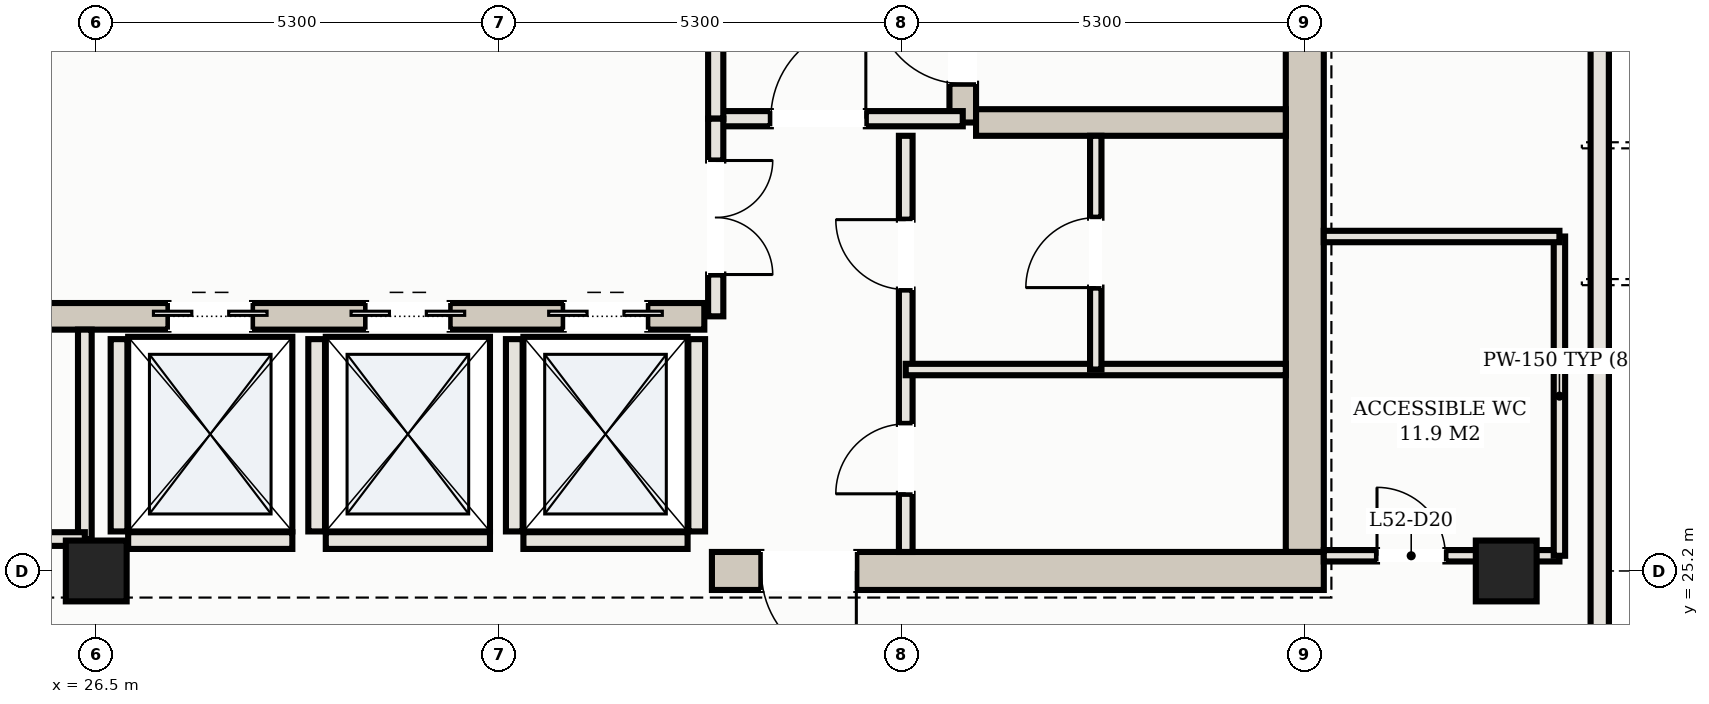
"""IFC4 building model, lengths in metres.
Left out: names, types, materials, properties, quantities, classifications, styles, units other than length and angle.
Written with IfcOpenShell. Run it as: python <this file> out.ifc"""

import sys

from ifc_helpers import new_model, si_unit, direction, frame, frame_2d, origin, origin_2d, place, context, subcontext, project, spatial, rectangle, hollow_rectangle, extrude, element, fill, save


model = new_model("IFC4")
c1 = context("Model", 3, precision=1e-05, world=origin(), true_north=direction((0.0, 1.0)))
c2 = subcontext(c1, "Body", "Model", "MODEL_VIEW")
j1 = project(units=[si_unit("LENGTHUNIT", "METRE"), si_unit("PLANEANGLEUNIT", "RADIAN")], contexts=[c1])
p1 = place(None, origin())
s1 = spatial("IfcSite", under=j1, at=p1, CompositionType="ELEMENT")
p2 = place(p1, origin())
s2 = spatial("IfcBuilding", under=s1, at=p2, CompositionType="ELEMENT")
p3 = place(p2, frame((0.0, 0.0, 192.2)))
s3 = spatial("IfcBuildingStorey", under=s2, at=p3, CompositionType="ELEMENT", Elevation=192.2)
p4 = place(p3, frame((42.4, 25.45, 0.0), z_axis=(0.0, 0.0, 1.0), x_axis=(0.0, 1.0, 0.0)))
e1 = element("IfcWall", 1, at=p4, inside=s3, PredefinedType="SHEAR", context=c2, shape_type="SweptSolid", body=[
    extrude(rectangle(XDim=14.3, YDim=0.5, at=frame_2d((7.15, 0.0))), origin(), (0.0, 0.0, 1.0), 4.31),
])
p5 = place(p3, frame((34.6, 25.2, 0.0), z_axis=(0.0, 0.0, 1.0), x_axis=(1.0, 0.0, 0.0)))
e2 = element("IfcWall", 2, at=p5, inside=s3, PredefinedType="SHEAR", context=c2, shape_type="SweptSolid", body=[
    extrude(rectangle(XDim=8.05, YDim=0.5, at=frame_2d((4.025, 0.0))), origin(), (0.0, 0.0, 1.0), 4.31),
])
p6 = place(p5, frame((0.65, 0.0, 0.0)))
e3 = element("IfcOpeningElement", 3, at=p6, cuts=e2, PredefinedType="OPENING", context=c2, shape_type="SweptSolid", body=[
    extrude(rectangle(XDim=1.25, YDim=2.2, at=frame_2d((0.625, 1.1))), frame((0.0, 0.26, 0.0), z_axis=(0.0, -1.0, 0.0), x_axis=(1.0, 0.0, 0.0)), (0.0, 0.0, 1.0), 0.52),
])
p7 = place(p3, frame((37.9, 31.1, 0.0), z_axis=(0.0, 0.0, 1.0), x_axis=(0.0, 1.0, 0.0)))
e4 = element("IfcWall", 4, at=p7, inside=s3, PredefinedType="SHEAR", context=c2, shape_type="SweptSolid", body=[
    extrude(rectangle(XDim=8.65, YDim=0.35, at=frame_2d((4.325, 0.0))), origin(), (0.0, 0.0, 1.0), 4.31),
])
p8 = place(p7, frame((0.51, 0.0, 0.0)))
e5 = element("IfcOpeningElement", 5, at=p8, cuts=e4, PredefinedType="OPENING", context=c2, shape_type="SweptSolid", body=[
    extrude(rectangle(XDim=1.15, YDim=2.2, at=frame_2d((0.575, 1.1))), frame((0.0, 0.185, 0.0), z_axis=(0.0, -1.0, 0.0), x_axis=(1.0, 0.0, 0.0)), (0.0, 0.0, 1.0), 0.37),
])
p9 = place(p3, frame((38.075, 31.1, 0.0), z_axis=(0.0, 0.0, 1.0), x_axis=(1.0, 0.0, 0.0)))
e6 = element("IfcWall", 6, at=p9, inside=s3, PredefinedType="SHEAR", context=c2, shape_type="SweptSolid", body=[
    extrude(rectangle(XDim=4.075, YDim=0.35, at=frame_2d((2.038, 0.0))), origin(), (0.0, 0.0, 1.0), 4.31),
])
p10 = place(p3, frame((18.5, 28.55, 0.0), z_axis=(0.0, 0.0, 1.0), x_axis=(1.0, 0.0, 0.0)))
e7 = element("IfcWall", 7, at=p10, inside=s3, PredefinedType="SHEAR", context=c2, shape_type="SweptSolid", body=[
    extrude(rectangle(XDim=16.0, YDim=0.35, at=frame_2d((8.0, 0.0))), origin(), (0.0, 0.0, 1.0), 4.31),
])
p11 = place(p10, frame((8.95, 0.0, 0.0)))
e8 = element("IfcOpeningElement", 8, at=p11, cuts=e7, PredefinedType="OPENING", context=c2, shape_type="SweptSolid", body=[
    extrude(rectangle(XDim=1.1, YDim=2.15, at=frame_2d((0.55, 1.075))), frame((0.0, 0.185, 0.0), z_axis=(0.0, -1.0, 0.0), x_axis=(1.0, 0.0, 0.0)), (0.0, 0.0, 1.0), 0.37),
])
p12 = place(p10, frame((11.55, 0.0, 0.0)))
e9 = element("IfcOpeningElement", 9, at=p12, cuts=e7, PredefinedType="OPENING", context=c2, shape_type="SweptSolid", body=[
    extrude(rectangle(XDim=1.1, YDim=2.15, at=frame_2d((0.55, 1.075))), frame((0.0, 0.185, 0.0), z_axis=(0.0, -1.0, 0.0), x_axis=(1.0, 0.0, 0.0)), (0.0, 0.0, 1.0), 0.37),
])
p13 = place(p10, frame((14.15, 0.0, 0.0)))
e10 = element("IfcOpeningElement", 10, at=p13, cuts=e7, PredefinedType="OPENING", context=c2, shape_type="SweptSolid", body=[
    extrude(rectangle(XDim=1.1, YDim=2.15, at=frame_2d((0.55, 1.075))), frame((0.0, 0.185, 0.0), z_axis=(0.0, -1.0, 0.0), x_axis=(1.0, 0.0, 0.0)), (0.0, 0.0, 1.0), 0.37),
])
for number, where, z_axis, x_axis in (
    (11, (26.5, 25.2, 0.0), (0.0, 0.0, 1.0), (1.0, 0.0, 0.0)),
    (12, (45.05, 25.2, 0.0), (0.0, 0.0, 1.0), (1.0, 0.0, 0.0)),
):
    element("IfcColumn", number, at=place(p3, frame(where, z_axis=z_axis, x_axis=x_axis)), inside=s3, PredefinedType="COLUMN", context=c2, shape_type="SweptSolid", body=[
        extrude(hollow_rectangle(XDim=0.8, YDim=0.8, WallThickness=0.028, at=origin_2d()), origin(), (0.0, 0.0, 1.0), 4.5),
    ])
p14 = place(p3, frame((26.8, 25.72, 0.0), z_axis=(0.0, 0.0, 1.0), x_axis=(0.0, 1.0, 0.0)))
e13 = element("IfcWall", 13, at=p14, inside=s3, PredefinedType="SOLIDWALL", context=c2, shape_type="SweptSolid", body=[
    extrude(rectangle(XDim=2.53, YDim=0.22, at=frame_2d((1.265, 0.0))), origin(), (0.0, 0.0, 1.0), 4.31),
])
p15 = place(p3, frame((26.92, 25.6, 0.0), z_axis=(0.0, 0.0, 1.0), x_axis=(1.0, 0.0, 0.0)))
e14 = element("IfcWall", 14, at=p15, inside=s3, PredefinedType="SOLIDWALL", context=c2, shape_type="SweptSolid", body=[
    extrude(rectangle(XDim=2.16, YDim=0.22, at=frame_2d((1.08, 0.0))), origin(), (0.0, 0.0, 1.0), 3.505),
])
p16 = place(p3, frame((29.4, 25.72, 0.0), z_axis=(0.0, 0.0, 1.0), x_axis=(0.0, 1.0, 0.0)))
e15 = element("IfcWall", 15, at=p16, inside=s3, PredefinedType="SOLIDWALL", context=c2, shape_type="SweptSolid", body=[
    extrude(rectangle(XDim=2.53, YDim=0.22, at=frame_2d((1.265, 0.0))), origin(), (0.0, 0.0, 1.0), 4.31),
])
p17 = place(p3, frame((29.52, 25.6, 0.0), z_axis=(0.0, 0.0, 1.0), x_axis=(1.0, 0.0, 0.0)))
e16 = element("IfcWall", 16, at=p17, inside=s3, PredefinedType="SOLIDWALL", context=c2, shape_type="SweptSolid", body=[
    extrude(rectangle(XDim=2.16, YDim=0.22, at=frame_2d((1.08, 0.0))), origin(), (0.0, 0.0, 1.0), 3.505),
])
for number, where, z_axis, x_axis in (
    (17, (32.0, 25.72, 0.0), (0.0, 0.0, 1.0), (0.0, 1.0, 0.0)),
    (18, (34.4, 25.72, 0.0), (0.0, 0.0, 1.0), (0.0, 1.0, 0.0)),
):
    element("IfcWall", number, at=place(p3, frame(where, z_axis=z_axis, x_axis=x_axis)), inside=s3, PredefinedType="SOLIDWALL", context=c2, shape_type="SweptSolid", body=[
        extrude(rectangle(XDim=2.53, YDim=0.22, at=frame_2d((1.265, 0.0))), origin(), (0.0, 0.0, 1.0), 4.31),
    ])
p18 = place(p3, frame((32.12, 25.6, 0.0), z_axis=(0.0, 0.0, 1.0), x_axis=(1.0, 0.0, 0.0)))
e19 = element("IfcWall", 19, at=p18, inside=s3, PredefinedType="SOLIDWALL", context=c2, shape_type="SweptSolid", body=[
    extrude(rectangle(XDim=2.16, YDim=0.22, at=frame_2d((1.08, 0.0))), origin(), (0.0, 0.0, 1.0), 3.505),
])
p19 = place(p3, frame((46.28, 10.52, 0.0), z_axis=(0.0, 0.0, 1.0), x_axis=(0.0, 1.0, 0.0)))
e20 = element("IfcWall", 20, at=p19, inside=s3, PredefinedType="SOLIDWALL", context=c2, shape_type="SweptSolid", body=[
    extrude(rectangle(XDim=26.41, YDim=0.24, at=frame_2d((13.205, 0.0))), origin(), (0.0, 0.0, 1.0), 4.31),
])
p20 = place(p3, frame((34.65, 31.15, 0.0), z_axis=(0.0, 0.0, 1.0), x_axis=(1.0, 0.0, 0.0)))
e21 = element("IfcWall", 21, at=p20, inside=s3, PredefinedType="PARTITIONING", context=c2, shape_type="SweptSolid", body=[
    extrude(rectangle(XDim=3.25, YDim=0.2, at=frame_2d((1.625, 0.0))), origin(), (0.0, 0.0, 1.0), 4.31),
])
p21 = place(p20, frame((0.725, 0.0, 0.0)))
e22 = element("IfcOpeningElement", 22, at=p21, cuts=e21, PredefinedType="OPENING", context=c2, shape_type="SweptSolid", body=[
    extrude(rectangle(XDim=1.25, YDim=2.2, at=frame_2d((0.625, 1.1))), frame((0.0, 0.11, 0.0), z_axis=(0.0, -1.0, 0.0), x_axis=(1.0, 0.0, 0.0)), (0.0, 0.0, 1.0), 0.22),
])
p22 = place(p3, frame((34.65, 31.15, 0.0), z_axis=(0.0, 0.0, 1.0), x_axis=(0.0, 1.0, 0.0)))
e23 = element("IfcWall", 23, at=p22, inside=s3, PredefinedType="PARTITIONING", context=c2, shape_type="SweptSolid", body=[
    extrude(rectangle(XDim=5.15, YDim=0.2, at=frame_2d((2.575, 0.0))), origin(), (0.0, 0.0, 1.0), 4.31),
])
p23 = place(p22, frame((1.875, 0.0, 0.0)))
e24 = element("IfcOpeningElement", 24, at=p23, cuts=e23, PredefinedType="OPENING", context=c2, shape_type="SweptSolid", body=[
    extrude(rectangle(XDim=1.25, YDim=2.2, at=frame_2d((0.625, 1.1))), frame((0.0, 0.11, 0.0), z_axis=(0.0, -1.0, 0.0), x_axis=(1.0, 0.0, 0.0)), (0.0, 0.0, 1.0), 0.22),
])
p24 = place(p3, frame((37.15, 25.45, 0.0), z_axis=(0.0, 0.0, 1.0), x_axis=(0.0, 1.0, 0.0)))
e25 = element("IfcWall", 25, at=p24, inside=s3, PredefinedType="PARTITIONING", context=c2, shape_type="SweptSolid", body=[
    extrude(rectangle(XDim=5.475, YDim=0.18, at=frame_2d((2.738, 0.0))), origin(), (0.0, 0.0, 1.0), 3.655),
])
p25 = place(p24, frame((0.765, 0.0, 0.0)))
e26 = element("IfcOpeningElement", 26, at=p25, cuts=e25, PredefinedType="OPENING", context=c2, shape_type="SweptSolid", body=[
    extrude(rectangle(XDim=0.92, YDim=2.15, at=frame_2d((0.46, 1.075))), frame((0.0, 0.1, 0.0), z_axis=(0.0, -1.0, 0.0), x_axis=(1.0, 0.0, 0.0)), (0.0, 0.0, 1.0), 0.2),
])
p26 = place(p24, frame((3.452, 0.0, 0.0)))
e27 = element("IfcOpeningElement", 27, at=p26, cuts=e25, PredefinedType="OPENING", context=c2, shape_type="SweptSolid", body=[
    extrude(rectangle(XDim=0.92, YDim=2.15, at=frame_2d((0.46, 1.075))), frame((0.0, 0.1, 0.0), z_axis=(0.0, -1.0, 0.0), x_axis=(1.0, 0.0, 0.0)), (0.0, 0.0, 1.0), 0.2),
])
p27 = place(p3, frame((37.15, 27.85, 0.0), z_axis=(0.0, 0.0, 1.0), x_axis=(1.0, 0.0, 0.0)))
e28 = element("IfcWall", 28, at=p27, inside=s3, PredefinedType="PARTITIONING", context=c2, shape_type="SweptSolid", body=[
    extrude(rectangle(XDim=5.0, YDim=0.15, at=frame_2d((2.5, 0.0))), origin(), (0.0, 0.0, 1.0), 4.31),
])
p28 = place(p3, frame((39.65, 27.85, 0.0), z_axis=(0.0, 0.0, 1.0), x_axis=(0.0, 1.0, 0.0)))
e29 = element("IfcWall", 29, at=p28, inside=s3, PredefinedType="PARTITIONING", context=c2, shape_type="SweptSolid", body=[
    extrude(rectangle(XDim=3.075, YDim=0.15, at=frame_2d((1.538, 0.0))), origin(), (0.0, 0.0, 1.0), 4.31),
])
p29 = place(p28, frame((1.078, 0.0, 0.0)))
e30 = element("IfcOpeningElement", 30, at=p29, cuts=e29, PredefinedType="OPENING", context=c2, shape_type="SweptSolid", body=[
    extrude(rectangle(XDim=0.92, YDim=2.15, at=frame_2d((0.46, 1.075))), frame((0.0, 0.085, 0.0), z_axis=(0.0, -1.0, 0.0), x_axis=(1.0, 0.0, 0.0)), (0.0, 0.0, 1.0), 0.17),
])
p30 = place(p3, frame((34.65, 28.55, 0.0), z_axis=(0.0, 0.0, 1.0), x_axis=(0.0, 1.0, 0.0)))
e31 = element("IfcWall", 31, at=p30, inside=s3, PredefinedType="PARTITIONING", context=c2, shape_type="SweptSolid", body=[
    extrude(rectangle(XDim=2.6, YDim=0.2, at=frame_2d((1.3, 0.0))), origin(), (0.0, 0.0, 1.0), 4.31),
])
p31 = place(p30, frame((0.55, 0.0, 0.0)))
e32 = element("IfcOpeningElement", 32, at=p31, cuts=e31, PredefinedType="OPENING", context=c2, shape_type="SweptSolid", body=[
    extrude(rectangle(XDim=1.5, YDim=2.25, at=frame_2d((0.75, 1.125))), frame((0.0, 0.11, 0.0), z_axis=(0.0, -1.0, 0.0), x_axis=(1.0, 0.0, 0.0)), (0.0, 0.0, 1.0), 0.22),
])
p32 = place(p3, frame((26.35, 25.62, 0.0), z_axis=(0.0, 0.0, 1.0), x_axis=(0.0, 1.0, 0.0)))
e33 = element("IfcWall", 33, at=p32, inside=s3, PredefinedType="PARTITIONING", context=c2, shape_type="SweptSolid", body=[
    extrude(rectangle(XDim=2.755, YDim=0.18, at=frame_2d((1.377, 0.0))), origin(), (0.0, 0.0, 1.0), 4.31),
])
p33 = place(p3, frame((18.45, 25.62, 0.0), z_axis=(0.0, 0.0, 1.0), x_axis=(1.0, 0.0, 0.0)))
e34 = element("IfcWall", 34, at=p33, inside=s3, PredefinedType="PARTITIONING", context=c2, shape_type="SweptSolid", body=[
    extrude(rectangle(XDim=7.9, YDim=0.18, at=frame_2d((3.95, 0.0))), origin(), (0.0, 0.0, 1.0), 4.31),
])
p34 = place(p33, frame((3.34, 0.0, 0.0)))
e35 = element("IfcOpeningElement", 35, at=p34, cuts=e34, PredefinedType="OPENING", context=c2, shape_type="SweptSolid", body=[
    extrude(rectangle(XDim=0.92, YDim=2.15, at=frame_2d((0.46, 1.075))), frame((0.0, 0.1, 0.0), z_axis=(0.0, -1.0, 0.0), x_axis=(1.0, 0.0, 0.0)), (0.0, 0.0, 1.0), 0.2),
])
p35 = place(p3, frame((42.65, 25.4, 0.0), z_axis=(0.0, 0.0, 1.0), x_axis=(1.0, 0.0, 0.0)))
e36 = element("IfcWall", 36, at=p35, inside=s3, PredefinedType="PARTITIONING", context=c2, shape_type="SweptSolid", body=[
    extrude(rectangle(XDim=3.1, YDim=0.15, at=frame_2d((1.55, 0.0))), origin(), (0.0, 0.0, 1.0), 3.655),
])
p36 = place(p35, frame((0.7, 0.0, 0.0)))
e37 = element("IfcOpeningElement", 37, at=p36, cuts=e36, PredefinedType="OPENING", context=c2, shape_type="SweptSolid", body=[
    extrude(rectangle(XDim=0.9, YDim=2.15, at=frame_2d((0.45, 1.075))), frame((0.0, 0.085, 0.0), z_axis=(0.0, -1.0, 0.0), x_axis=(1.0, 0.0, 0.0)), (0.0, 0.0, 1.0), 0.17),
])
p37 = place(p3, frame((45.75, 25.4, 0.0), z_axis=(0.0, 0.0, 1.0), x_axis=(0.0, 1.0, 0.0)))
e38 = element("IfcWall", 38, at=p37, inside=s3, PredefinedType="PARTITIONING", context=c2, shape_type="SweptSolid", body=[
    extrude(rectangle(XDim=4.2, YDim=0.15, at=frame_2d((2.1, 0.0))), origin(), (0.0, 0.0, 1.0), 4.31),
])
p38 = place(p3, frame((42.65, 29.6, 0.0), z_axis=(0.0, 0.0, 1.0), x_axis=(1.0, 0.0, 0.0)))
e39 = element("IfcWall", 39, at=p38, inside=s3, PredefinedType="PARTITIONING", context=c2, shape_type="SweptSolid", body=[
    extrude(rectangle(XDim=3.1, YDim=0.15, at=frame_2d((1.55, 0.0))), origin(), (0.0, 0.0, 1.0), 4.31),
])
p39 = place(p11, origin())
e40 = element("IfcDoor", 40, at=p39, inside=s3, OperationType="DOUBLE_DOOR_SLIDING", PredefinedType="DOOR", context=c2, shape_type="SweptSolid", body=[
    extrude(rectangle(XDim=1.1, YDim=2.15, at=frame_2d((0.55, 1.075))), frame((0.0, 0.025, 0.0), z_axis=(0.0, -1.0, 0.0), x_axis=(1.0, 0.0, 0.0)), (0.0, 0.0, 1.0), 0.05),
])
fill(e8, e40)
p40 = place(p12, origin())
e41 = element("IfcDoor", 41, at=p40, inside=s3, OperationType="DOUBLE_DOOR_SLIDING", PredefinedType="DOOR", context=c2, shape_type="SweptSolid", body=[
    extrude(rectangle(XDim=1.1, YDim=2.15, at=frame_2d((0.55, 1.075))), frame((0.0, 0.025, 0.0), z_axis=(0.0, -1.0, 0.0), x_axis=(1.0, 0.0, 0.0)), (0.0, 0.0, 1.0), 0.05),
])
fill(e9, e41)
p41 = place(p13, origin())
e42 = element("IfcDoor", 42, at=p41, inside=s3, OperationType="DOUBLE_DOOR_SLIDING", PredefinedType="DOOR", context=c2, shape_type="SweptSolid", body=[
    extrude(rectangle(XDim=1.1, YDim=2.15, at=frame_2d((0.55, 1.075))), frame((0.0, 0.025, 0.0), z_axis=(0.0, -1.0, 0.0), x_axis=(1.0, 0.0, 0.0)), (0.0, 0.0, 1.0), 0.05),
])
fill(e10, e42)
p42 = place(p6, frame((1.25, 0.0, 0.0), z_axis=(0.0, 0.0, 1.0), x_axis=(-1.0, 0.0, 0.0)))
e43 = element("IfcDoor", 43, at=p42, inside=s3, OperationType="SINGLE_SWING_LEFT", PredefinedType="DOOR", context=c2, shape_type="SweptSolid", body=[
    extrude(rectangle(XDim=1.25, YDim=2.2, at=frame_2d((0.625, 1.1))), frame((0.0, 0.025, 0.0), z_axis=(0.0, -1.0, 0.0), x_axis=(1.0, 0.0, 0.0)), (0.0, 0.0, 1.0), 0.05),
])
fill(e3, e43)
p43 = place(p21, origin())
e44 = element("IfcDoor", 44, at=p43, inside=s3, OperationType="SINGLE_SWING_RIGHT", PredefinedType="DOOR", context=c2, shape_type="SweptSolid", body=[
    extrude(rectangle(XDim=1.25, YDim=2.2, at=frame_2d((0.625, 1.1))), frame((0.0, 0.025, 0.0), z_axis=(0.0, -1.0, 0.0), x_axis=(1.0, 0.0, 0.0)), (0.0, 0.0, 1.0), 0.05),
])
fill(e22, e44)
p44 = place(p8, origin())
e45 = element("IfcDoor", 45, at=p44, inside=s3, OperationType="SINGLE_SWING_RIGHT", PredefinedType="DOOR", context=c2, shape_type="SweptSolid", body=[
    extrude(rectangle(XDim=1.15, YDim=2.2, at=frame_2d((0.575, 1.1))), frame((0.0, 0.025, 0.0), z_axis=(0.0, -1.0, 0.0), x_axis=(1.0, 0.0, 0.0)), (0.0, 0.0, 1.0), 0.05),
])
fill(e5, e45)
p45 = place(p25, origin())
e46 = element("IfcDoor", 46, at=p45, inside=s3, OperationType="SINGLE_SWING_LEFT", PredefinedType="DOOR", context=c2, shape_type="SweptSolid", body=[
    extrude(rectangle(XDim=0.92, YDim=2.15, at=frame_2d((0.46, 1.075))), frame((0.0, 0.025, 0.0), z_axis=(0.0, -1.0, 0.0), x_axis=(1.0, 0.0, 0.0)), (0.0, 0.0, 1.0), 0.05),
])
fill(e26, e46)
p46 = place(p26, origin())
e47 = element("IfcDoor", 47, at=p46, inside=s3, OperationType="SINGLE_SWING_RIGHT", PredefinedType="DOOR", context=c2, shape_type="SweptSolid", body=[
    extrude(rectangle(XDim=0.92, YDim=2.15, at=frame_2d((0.46, 1.075))), frame((0.0, 0.025, 0.0), z_axis=(0.0, -1.0, 0.0), x_axis=(1.0, 0.0, 0.0)), (0.0, 0.0, 1.0), 0.05),
])
fill(e27, e47)
p47 = place(p29, origin())
e48 = element("IfcDoor", 48, at=p47, inside=s3, OperationType="SINGLE_SWING_LEFT", PredefinedType="DOOR", context=c2, shape_type="SweptSolid", body=[
    extrude(rectangle(XDim=0.92, YDim=2.15, at=frame_2d((0.46, 1.075))), frame((0.0, 0.025, 0.0), z_axis=(0.0, -1.0, 0.0), x_axis=(1.0, 0.0, 0.0)), (0.0, 0.0, 1.0), 0.05),
])
fill(e30, e48)
p48 = place(p31, frame((1.5, 0.0, 0.0), z_axis=(0.0, 0.0, 1.0), x_axis=(-1.0, 0.0, 0.0)))
e49 = element("IfcDoor", 49, at=p48, inside=s3, OperationType="DOUBLE_DOOR_SINGLE_SWING", PredefinedType="DOOR", context=c2, shape_type="SweptSolid", body=[
    extrude(rectangle(XDim=1.5, YDim=2.25, at=frame_2d((0.75, 1.125))), frame((0.0, 0.025, 0.0), z_axis=(0.0, -1.0, 0.0), x_axis=(1.0, 0.0, 0.0)), (0.0, 0.0, 1.0), 0.05),
])
fill(e32, e49)
p49 = place(p36, origin())
e50 = element("IfcDoor", 50, at=p49, inside=s3, OperationType="SINGLE_SWING_LEFT", PredefinedType="DOOR", context=c2, shape_type="SweptSolid", body=[
    extrude(rectangle(XDim=0.9, YDim=2.15, at=frame_2d((0.45, 1.075))), frame((0.0, 0.025, 0.0), z_axis=(0.0, -1.0, 0.0), x_axis=(1.0, 0.0, 0.0)), (0.0, 0.0, 1.0), 0.05),
])
fill(e37, e50)
save(model, sys.argv[1])
